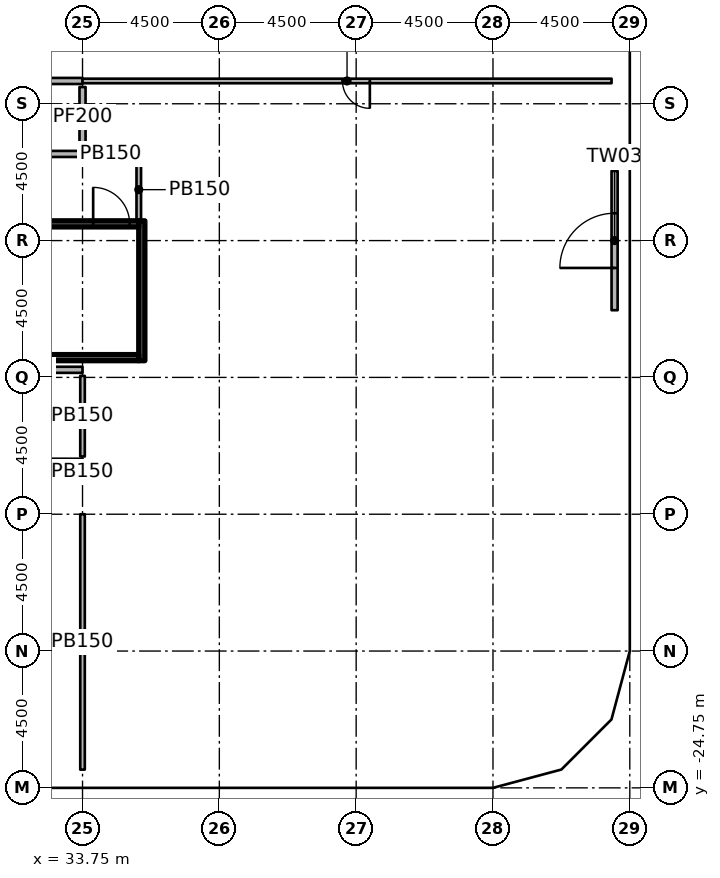
"""IFC4 building model, lengths in metres.
Left out: names, types, materials, properties, quantities, classifications, styles, units other than length and angle.
Written with IfcOpenShell. Run it as: python <this file> out.ifc"""

import sys

from ifc_helpers import new_model, si_unit, direction, frame, frame_2d, origin, origin_2d, place, context, subcontext, project, spatial, rectangle, extrude, element, fill, save


model = new_model("IFC4")
c1 = context("Model", 3, precision=1e-05, world=origin(), true_north=direction((0.0, 1.0)))
c2 = subcontext(c1, "Body", "Model", "MODEL_VIEW")
j1 = project(units=[si_unit("LENGTHUNIT", "METRE"), si_unit("PLANEANGLEUNIT", "RADIAN")], contexts=[c1])
p1 = place(None, origin())
s1 = spatial("IfcSite", under=j1, at=p1, CompositionType="ELEMENT")
p2 = place(p1, origin())
s2 = spatial("IfcBuilding", under=s1, at=p2, CompositionType="ELEMENT")
p3 = place(p2, frame((0.0, 0.0, 7.0)))
s3 = spatial("IfcBuildingStorey", under=s2, at=p3, CompositionType="ELEMENT", Elevation=7.0)
for number, where, z_axis, x_axis in (
    (1, (33.75, -15.15, 0.0), (0.0, 0.0, 1.0), (1.0, 0.0, 0.0)),
    (2, (33.11, -2.25, 0.0), (0.0, 0.0, 1.0), (1.0, 0.0, 0.0)),
    (3, (38.25, -19.65, 0.0), (0.0, 0.0, 1.0), (1.0, 0.0, 0.0)),
    (4, (42.75, -24.15, 0.0), (0.0, 0.0, 1.0), (1.0, 0.0, 0.0)),
    (5, (41.97, -11.25, 0.0), (0.0, 0.0, 1.0), (1.0, 0.0, 0.0)),
    (6, (46.47, -15.75, 0.0), (0.0, 0.0, 1.0), (1.0, 0.0, 0.0)),
    (7, (46.65, -2.25, 0.0), (0.0, 0.0, 1.0), (1.0, 0.0, 0.0)),
    (8, (50.97, -20.25, 0.0), (0.0, 0.0, 1.0), (1.0, 0.0, 0.0)),
):
    element("IfcColumn", number, at=place(p3, frame(where, z_axis=z_axis, x_axis=x_axis)), inside=s3, PredefinedType="COLUMN", context=c2, shape_type="SweptSolid", body=[
        extrude(rectangle(XDim=1.2, YDim=1.2, at=origin_2d()), origin(), (0.0, 0.0, 1.0), 4.55),
    ])
p4 = place(p3, frame((51.25, -9.04, 0.0), z_axis=(0.0, 0.0, 1.0), x_axis=(0.0, 1.0, 0.0)))
e9 = element("IfcWall", 9, at=p4, inside=s3, PredefinedType="SOLIDWALL", context=c2, shape_type="SweptSolid", body=[
    extrude(rectangle(XDim=4.58, YDim=0.2, at=frame_2d((2.29, 0.0))), origin(), (0.0, 0.0, 1.0), 4.55),
])
p5 = place(p4, frame((1.39, 0.0, 0.0)))
e10 = element("IfcOpeningElement", 10, at=p5, cuts=e9, PredefinedType="OPENING", context=c2, shape_type="SweptSolid", body=[
    extrude(rectangle(XDim=1.8, YDim=2.4, at=frame_2d((0.9, 1.2))), frame((0.0, 0.11, 0.0), z_axis=(0.0, -1.0, 0.0), x_axis=(1.0, 0.0, 0.0)), (0.0, 0.0, 1.0), 0.22),
])
p6 = place(p3, frame((35.7, -10.7, 0.0), z_axis=(0.0, 0.0, 1.0), x_axis=(0.0, 1.0, 0.0)))
e11 = element("IfcWall", 11, at=p6, inside=s3, PredefinedType="SHEAR", context=c2, shape_type="SweptSolid", body=[
    extrude(rectangle(XDim=4.6, YDim=0.2, at=frame_2d((2.3, 0.0))), origin(), (0.0, 0.0, 1.0), 4.55),
])
p7 = place(p3, frame((28.0, -10.6, 0.0), z_axis=(0.0, 0.0, 1.0), x_axis=(1.0, 0.0, 0.0)))
e12 = element("IfcWall", 12, at=p7, inside=s3, PredefinedType="SHEAR", context=c2, shape_type="SweptSolid", body=[
    extrude(rectangle(XDim=7.6, YDim=0.2, at=frame_2d((3.8, 0.0))), origin(), (0.0, 0.0, 1.0), 4.55),
])
p8 = place(p3, frame((28.0, -6.2, 0.0), z_axis=(0.0, 0.0, 1.0), x_axis=(1.0, 0.0, 0.0)))
e13 = element("IfcWall", 13, at=p8, inside=s3, PredefinedType="SHEAR", context=c2, shape_type="SweptSolid", body=[
    extrude(rectangle(XDim=7.6, YDim=0.2, at=frame_2d((3.8, 0.0))), origin(), (0.0, 0.0, 1.0), 4.55),
])
p9 = place(p8, frame((6.1, 0.0, 0.0)))
e14 = element("IfcOpeningElement", 14, at=p9, cuts=e13, PredefinedType="OPENING", context=c2, shape_type="SweptSolid", body=[
    extrude(rectangle(XDim=1.2, YDim=2.1, at=frame_2d((0.6, 1.05))), frame((0.0, 0.11, 0.0), z_axis=(0.0, -1.0, 0.0), x_axis=(1.0, 0.0, 0.0)), (0.0, 0.0, 1.0), 0.22),
])
p10 = place(p3, frame((28.2, -3.9, 0.0), z_axis=(0.0, 0.0, 1.0), x_axis=(1.0, 0.0, 0.0)))
e15 = element("IfcWall", 15, at=p10, inside=s3, PredefinedType="PARTITIONING", context=c2, shape_type="SweptSolid", body=[
    extrude(rectangle(XDim=5.55, YDim=0.2, at=frame_2d((2.775, 0.0))), origin(), (0.0, 0.0, 1.0), 4.55),
])
p11 = place(p3, frame((33.75, -3.9, 0.0), z_axis=(0.0, 0.0, 1.0), x_axis=(1.0, 0.0, 0.0)))
e16 = element("IfcWall", 16, at=p11, inside=s3, PredefinedType="PARTITIONING", context=c2, shape_type="SweptSolid", body=[
    extrude(rectangle(XDim=1.85, YDim=0.15, at=frame_2d((0.925, 0.0))), origin(), (0.0, 0.0, 1.0), 4.55),
])
p12 = place(p3, frame((35.6, -4.05, 0.0), z_axis=(0.0, 0.0, 1.0), x_axis=(0.0, -1.0, 0.0)))
e17 = element("IfcWall", 17, at=p12, inside=s3, PredefinedType="PARTITIONING", context=c2, shape_type="SweptSolid", body=[
    extrude(rectangle(XDim=2.05, YDim=0.15, at=frame_2d((1.025, 0.0))), origin(), (0.0, 0.0, 1.0), 4.55),
])
p13 = place(p3, frame((29.85, -11.0, 0.0), z_axis=(0.0, 0.0, 1.0), x_axis=(1.0, 0.0, 0.0)))
e18 = element("IfcWall", 18, at=p13, inside=s3, PredefinedType="PARTITIONING", context=c2, shape_type="SweptSolid", body=[
    extrude(rectangle(XDim=3.9, YDim=0.2, at=frame_2d((1.95, 0.0))), origin(), (0.0, 0.0, 1.0), 4.55),
])
p14 = place(p3, frame((33.75, -14.0, 0.0), z_axis=(0.0, 0.0, 1.0), x_axis=(-1.0, 0.0, 0.0)))
e19 = element("IfcWall", 19, at=p14, inside=s3, PredefinedType="PARTITIONING", context=c2, shape_type="SweptSolid", body=[
    extrude(rectangle(XDim=9.75, YDim=0.15, at=frame_2d((4.875, 0.0))), origin(), (0.0, 0.0, 1.0), 4.55),
])
p15 = place(p14, frame((4.425, 0.0, 0.0)))
e20 = element("IfcOpeningElement", 20, at=p15, cuts=e19, PredefinedType="OPENING", context=c2, shape_type="SweptSolid", body=[
    extrude(rectangle(XDim=0.9, YDim=2.1, at=frame_2d((0.45, 1.05))), frame((0.0, 0.085, 0.0), z_axis=(0.0, -1.0, 0.0), x_axis=(1.0, 0.0, 0.0)), (0.0, 0.0, 1.0), 0.17),
])
p16 = place(p3, frame((33.75, -11.2, 0.0), z_axis=(0.0, 0.0, 1.0), x_axis=(0.0, -1.0, 0.0)))
e21 = element("IfcWall", 21, at=p16, inside=s3, PredefinedType="PARTITIONING", context=c2, shape_type="SweptSolid", body=[
    extrude(rectangle(XDim=2.65, YDim=0.15, at=frame_2d((1.325, 0.0))), origin(), (0.0, 0.0, 1.0), 4.55),
])
p17 = place(p3, frame((33.75, -1.5, 0.0), z_axis=(0.0, 0.0, 1.0), x_axis=(-1.0, 0.0, 0.0)))
e22 = element("IfcWall", 22, at=p17, inside=s3, PredefinedType="PARTITIONING", context=c2, shape_type="SweptSolid", body=[
    extrude(rectangle(XDim=23.8, YDim=0.2, at=frame_2d((11.9, 0.0))), origin(), (0.0, 0.0, 1.0), 4.55),
])
p18 = place(p17, frame((11.45, 0.0, 0.0)))
e23 = element("IfcOpeningElement", 23, at=p18, cuts=e22, PredefinedType="OPENING", context=c2, shape_type="SweptSolid", body=[
    extrude(rectangle(XDim=0.9, YDim=2.1, at=frame_2d((0.45, 1.05))), frame((0.0, 0.11, 0.0), z_axis=(0.0, -1.0, 0.0), x_axis=(1.0, 0.0, 0.0)), (0.0, 0.0, 1.0), 0.22),
])
p19 = place(p3, frame((33.75, -1.7, 0.0), z_axis=(0.0, 0.0, 1.0), x_axis=(0.0, -1.0, 0.0)))
e24 = element("IfcWall", 24, at=p19, inside=s3, PredefinedType="PARTITIONING", context=c2, shape_type="SweptSolid", body=[
    extrude(rectangle(XDim=2.0, YDim=0.2, at=frame_2d((1.0, 0.0))), origin(), (0.0, 0.0, 1.0), 4.55),
])
p20 = place(p3, frame((33.75, -14.15, 0.0), z_axis=(0.0, 0.0, 1.0), x_axis=(0.0, -1.0, 0.0)))
e25 = element("IfcWall", 25, at=p20, inside=s3, PredefinedType="PARTITIONING", context=c2, shape_type="SweptSolid", body=[
    extrude(rectangle(XDim=0.4, YDim=0.15, at=frame_2d((0.2, 0.0))), origin(), (0.0, 0.0, 1.0), 4.55),
])
p21 = place(p3, frame((33.75, -15.75, 0.0), z_axis=(0.0, 0.0, 1.0), x_axis=(0.0, -1.0, 0.0)))
e26 = element("IfcWall", 26, at=p21, inside=s3, PredefinedType="PARTITIONING", context=c2, shape_type="SweptSolid", body=[
    extrude(rectangle(XDim=8.4, YDim=0.15, at=frame_2d((4.2, 0.0))), origin(), (0.0, 0.0, 1.0), 4.55),
])
p22 = place(p3, frame((51.15, -1.5, 0.0), z_axis=(0.0, 0.0, 1.0), x_axis=(-1.0, 0.0, 0.0)))
e27 = element("IfcWall", 27, at=p22, inside=s3, PredefinedType="PARTITIONING", context=c2, shape_type="SweptSolid", body=[
    extrude(rectangle(XDim=17.4, YDim=0.15, at=frame_2d((8.7, 0.0))), origin(), (0.0, 0.0, 1.0), 4.55),
])
p23 = place(p22, frame((7.95, 0.0, 0.0)))
e28 = element("IfcOpeningElement", 28, at=p23, cuts=e27, PredefinedType="OPENING", context=c2, shape_type="SweptSolid", body=[
    extrude(rectangle(XDim=0.9, YDim=2.1, at=frame_2d((0.45, 1.05))), frame((0.0, 0.085, 0.0), z_axis=(0.0, -1.0, 0.0), x_axis=(1.0, 0.0, 0.0)), (0.0, 0.0, 1.0), 0.17),
])
p24 = place(p5, origin())
e29 = element("IfcDoor", 29, at=p24, inside=s3, OperationType="SINGLE_SWING_LEFT", PredefinedType="DOOR", context=c2, shape_type="SweptSolid", body=[
    extrude(rectangle(XDim=1.8, YDim=2.4, at=frame_2d((0.9, 1.2))), frame((0.0, 0.025, 0.0), z_axis=(0.0, -1.0, 0.0), x_axis=(1.0, 0.0, 0.0)), (0.0, 0.0, 1.0), 0.05),
])
fill(e10, e29)
p25 = place(p9, origin())
e30 = element("IfcDoor", 30, at=p25, inside=s3, OperationType="SINGLE_SWING_RIGHT", PredefinedType="DOOR", context=c2, shape_type="SweptSolid", body=[
    extrude(rectangle(XDim=1.2, YDim=2.1, at=frame_2d((0.6, 1.05))), frame((0.0, 0.025, 0.0), z_axis=(0.0, -1.0, 0.0), x_axis=(1.0, 0.0, 0.0)), (0.0, 0.0, 1.0), 0.05),
])
fill(e14, e30)
p26 = place(p23, origin())
e31 = element("IfcDoor", 31, at=p26, inside=s3, OperationType="SINGLE_SWING_LEFT", PredefinedType="DOOR", context=c2, shape_type="SweptSolid", body=[
    extrude(rectangle(XDim=0.9, YDim=2.1, at=frame_2d((0.45, 1.05))), frame((0.0, 0.025, 0.0), z_axis=(0.0, -1.0, 0.0), x_axis=(1.0, 0.0, 0.0)), (0.0, 0.0, 1.0), 0.05),
])
fill(e28, e31)
save(model, sys.argv[1])
